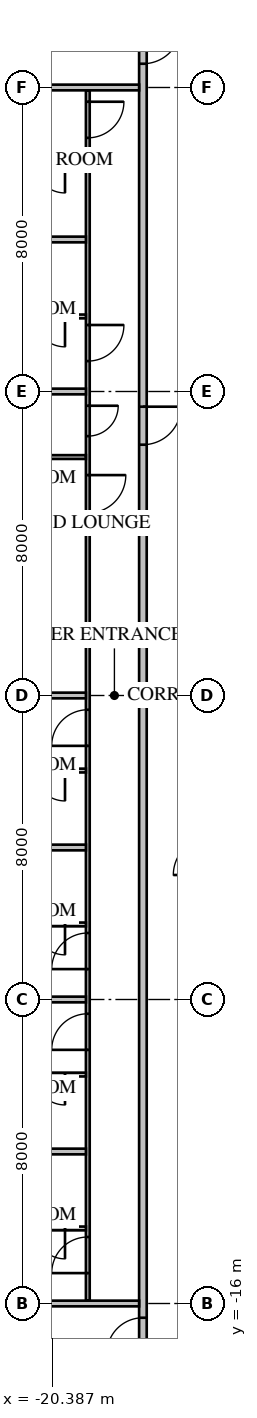
"""IFC4 building model, lengths in metres.
Left out: names, types, materials, properties, quantities, classifications, styles, units other than length and angle.
Written with IfcOpenShell. Run it as: python <this file> out.ifc"""

import sys

from ifc_helpers import new_model, si_unit, direction, frame, frame_2d, origin, place, context, subcontext, project, spatial, rectangle, extrude, element, fill, save


model = new_model("IFC4")
c1 = context("Model", 3, precision=1e-05, world=origin(), true_north=direction((0.0, 1.0)))
c2 = subcontext(c1, "Body", "Model", "MODEL_VIEW")
j1 = project(units=[si_unit("LENGTHUNIT", "METRE"), si_unit("PLANEANGLEUNIT", "RADIAN")], contexts=[c1])
p1 = place(None, origin())
s1 = spatial("IfcSite", under=j1, at=p1, CompositionType="ELEMENT")
p2 = place(p1, origin())
s2 = spatial("IfcBuilding", under=s1, at=p2, CompositionType="ELEMENT")
p3 = place(p2, frame((0.0, 0.0, 35.25)))
s3 = spatial("IfcBuildingStorey", under=s2, at=p3, CompositionType="ELEMENT", Elevation=35.25)
p4 = place(p3, frame((-18.0, 18.0, 0.0), z_axis=(0.0, 0.0, 1.0), x_axis=(0.0, -1.0, 0.0)))
e1 = element("IfcWall", 1, at=p4, inside=s3, PredefinedType="PARTITIONING", context=c2, shape_type="SweptSolid", body=[
    extrude(rectangle(XDim=36.0, YDim=0.2, at=frame_2d((18.0, 0.0))), origin(), (0.0, 0.0, 1.0), 3.65),
])
p5 = place(p4, frame((10.4, 0.0, 0.0)))
e2 = element("IfcOpeningElement", 2, at=p5, cuts=e1, PredefinedType="OPENING", context=c2, shape_type="SweptSolid", body=[
    extrude(rectangle(XDim=1.0, YDim=2.1, at=frame_2d((0.5, 1.05))), frame((0.0, 0.12, 0.0), z_axis=(0.0, -1.0, 0.0), x_axis=(1.0, 0.0, 0.0)), (0.0, 0.0, 1.0), 0.24),
])
p6 = place(p4, frame((0.375, 0.0, 0.0)))
e3 = element("IfcOpeningElement", 3, at=p6, cuts=e1, PredefinedType="OPENING", context=c2, shape_type="SweptSolid", body=[
    extrude(rectangle(XDim=1.0, YDim=2.1, at=frame_2d((0.5, 1.05))), frame((0.0, 0.12, 0.0), z_axis=(0.0, -1.0, 0.0), x_axis=(1.0, 0.0, 0.0)), (0.0, 0.0, 1.0), 0.24),
])
p7 = place(p4, frame((34.375, 0.0, 0.0)))
e4 = element("IfcOpeningElement", 4, at=p7, cuts=e1, PredefinedType="OPENING", context=c2, shape_type="SweptSolid", body=[
    extrude(rectangle(XDim=0.95, YDim=2.1, at=frame_2d((0.475, 1.05))), frame((0.0, 0.12, 0.0), z_axis=(0.0, -1.0, 0.0), x_axis=(1.0, 0.0, 0.0)), (0.0, 0.0, 1.0), 0.24),
])
p8 = place(p3, frame((-19.45, 15.925, 0.0), z_axis=(0.0, 0.0, 1.0), x_axis=(0.0, -1.0, 0.0)))
e5 = element("IfcWall", 5, at=p8, inside=s3, PredefinedType="PARTITIONING", context=c2, shape_type="SweptSolid", body=[
    extrude(rectangle(XDim=31.85, YDim=0.1, at=frame_2d((15.925, 0.0))), origin(), (0.0, 0.0, 1.0), 3.65),
])
p9 = place(p8, frame((10.125, 0.0, 0.0)))
e6 = element("IfcOpeningElement", 6, at=p9, cuts=e5, PredefinedType="OPENING", context=c2, shape_type="SweptSolid", body=[
    extrude(rectangle(XDim=1.0, YDim=2.1, at=frame_2d((0.5, 1.05))), frame((0.0, 0.07, 0.0), z_axis=(0.0, -1.0, 0.0), x_axis=(1.0, 0.0, 0.0)), (0.0, 0.0, 1.0), 0.14),
])
p10 = place(p8, frame((8.3, 0.0, 0.0)))
e7 = element("IfcOpeningElement", 7, at=p10, cuts=e5, PredefinedType="OPENING", context=c2, shape_type="SweptSolid", body=[
    extrude(rectangle(XDim=0.8, YDim=2.1, at=frame_2d((0.4, 1.05))), frame((0.0, 0.07, 0.0), z_axis=(0.0, -1.0, 0.0), x_axis=(1.0, 0.0, 0.0)), (0.0, 0.0, 1.0), 0.14),
])
p11 = place(p8, frame((0.3, 0.0, 0.0)))
e8 = element("IfcOpeningElement", 8, at=p11, cuts=e5, PredefinedType="OPENING", context=c2, shape_type="SweptSolid", body=[
    extrude(rectangle(XDim=0.95, YDim=2.1, at=frame_2d((0.475, 1.05))), frame((0.0, 0.07, 0.0), z_axis=(0.0, -1.0, 0.0), x_axis=(1.0, 0.0, 0.0)), (0.0, 0.0, 1.0), 0.14),
])
p12 = place(p8, frame((6.175, 0.0, 0.0)))
e9 = element("IfcOpeningElement", 9, at=p12, cuts=e5, PredefinedType="OPENING", context=c2, shape_type="SweptSolid", body=[
    extrude(rectangle(XDim=0.95, YDim=2.1, at=frame_2d((0.475, 1.05))), frame((0.0, 0.07, 0.0), z_axis=(0.0, -1.0, 0.0), x_axis=(1.0, 0.0, 0.0)), (0.0, 0.0, 1.0), 0.14),
])
p13 = place(p8, frame((16.3, 0.0, 0.0)))
e10 = element("IfcOpeningElement", 10, at=p13, cuts=e5, PredefinedType="OPENING", context=c2, shape_type="SweptSolid", body=[
    extrude(rectangle(XDim=0.95, YDim=2.1, at=frame_2d((0.475, 1.05))), frame((0.0, 0.07, 0.0), z_axis=(0.0, -1.0, 0.0), x_axis=(1.0, 0.0, 0.0)), (0.0, 0.0, 1.0), 0.14),
])
p14 = place(p8, frame((22.175, 0.0, 0.0)))
e11 = element("IfcOpeningElement", 11, at=p14, cuts=e5, PredefinedType="OPENING", context=c2, shape_type="SweptSolid", body=[
    extrude(rectangle(XDim=0.95, YDim=2.1, at=frame_2d((0.475, 1.05))), frame((0.0, 0.07, 0.0), z_axis=(0.0, -1.0, 0.0), x_axis=(1.0, 0.0, 0.0)), (0.0, 0.0, 1.0), 0.14),
])
p15 = place(p8, frame((24.3, 0.0, 0.0)))
e12 = element("IfcOpeningElement", 12, at=p15, cuts=e5, PredefinedType="OPENING", context=c2, shape_type="SweptSolid", body=[
    extrude(rectangle(XDim=0.95, YDim=2.1, at=frame_2d((0.475, 1.05))), frame((0.0, 0.07, 0.0), z_axis=(0.0, -1.0, 0.0), x_axis=(1.0, 0.0, 0.0)), (0.0, 0.0, 1.0), 0.14),
])
p16 = place(p8, frame((30.175, 0.0, 0.0)))
e13 = element("IfcOpeningElement", 13, at=p16, cuts=e5, PredefinedType="OPENING", context=c2, shape_type="SweptSolid", body=[
    extrude(rectangle(XDim=0.95, YDim=2.1, at=frame_2d((0.475, 1.05))), frame((0.0, 0.07, 0.0), z_axis=(0.0, -1.0, 0.0), x_axis=(1.0, 0.0, 0.0)), (0.0, 0.0, 1.0), 0.14),
])
p17 = place(p3, frame((-19.5, 6.275, 0.0), z_axis=(0.0, 0.0, 1.0), x_axis=(-1.0, 0.0, 0.0)))
e14 = element("IfcWall", 14, at=p17, inside=s3, PredefinedType="PARTITIONING", context=c2, shape_type="SweptSolid", body=[
    extrude(rectangle(XDim=2.1, YDim=0.1, at=frame_2d((1.05, 0.0))), origin(), (0.0, 0.0, 1.0), 3.65),
])
p18 = place(p3, frame((-18.1, 16.0, 0.0), z_axis=(0.0, 0.0, 1.0), x_axis=(-1.0, 0.0, 0.0)))
e15 = element("IfcWall", 15, at=p18, inside=s3, PredefinedType="PARTITIONING", context=c2, shape_type="SweptSolid", body=[
    extrude(rectangle(XDim=6.589, YDim=0.15, at=frame_2d((3.295, 0.0))), origin(), (0.0, 0.0, 1.0), 3.65),
])
for number, where, z_axis, x_axis in (
    (16, (-19.5, 12.0, 0.0), (0.0, 0.0, 1.0), (-1.0, 0.0, 0.0)),
    (17, (-19.5, 8.0, 0.0), (0.0, 0.0, 1.0), (-1.0, 0.0, 0.0)),
):
    element("IfcWall", number, at=place(p3, frame(where, z_axis=z_axis, x_axis=x_axis)), inside=s3, PredefinedType="PARTITIONING", context=c2, shape_type="SweptSolid", body=[
        extrude(rectangle(XDim=5.2, YDim=0.15, at=frame_2d((2.6, 0.0))), origin(), (0.0, 0.0, 1.0), 3.65),
    ])
p19 = place(p3, frame((-19.5, 0.0, 0.0), z_axis=(0.0, 0.0, 1.0), x_axis=(-1.0, 0.0, 0.0)))
e18 = element("IfcWall", 18, at=p19, inside=s3, PredefinedType="PARTITIONING", context=c2, shape_type="SweptSolid", body=[
    extrude(rectangle(XDim=5.2, YDim=0.15, at=frame_2d((2.6, 0.0))), origin(), (0.0, 0.0, 1.0), 2.957),
])
for number, where, z_axis, x_axis in (
    (19, (-19.5, -4.0, 0.0), (0.0, 0.0, 1.0), (-1.0, 0.0, 0.0)),
    (20, (-19.5, -8.0, 0.0), (0.0, 0.0, 1.0), (-1.0, 0.0, 0.0)),
    (21, (-19.5, -12.0, 0.0), (0.0, 0.0, 1.0), (-1.0, 0.0, 0.0)),
):
    element("IfcWall", number, at=place(p3, frame(where, z_axis=z_axis, x_axis=x_axis)), inside=s3, PredefinedType="PARTITIONING", context=c2, shape_type="SweptSolid", body=[
        extrude(rectangle(XDim=5.2, YDim=0.15, at=frame_2d((2.6, 0.0))), origin(), (0.0, 0.0, 1.0), 3.65),
    ])
p20 = place(p3, frame((-18.1, -16.0, 0.0), z_axis=(0.0, 0.0, 1.0), x_axis=(-1.0, 0.0, 0.0)))
e22 = element("IfcWall", 22, at=p20, inside=s3, PredefinedType="PARTITIONING", context=c2, shape_type="SweptSolid", body=[
    extrude(rectangle(XDim=6.589, YDim=0.15, at=frame_2d((3.295, 0.0))), origin(), (0.0, 0.0, 1.0), 3.65),
])
p21 = place(p3, frame((-19.5, 14.025, 0.0), z_axis=(0.0, 0.0, 1.0), x_axis=(-1.0, 0.0, 0.0)))
e23 = element("IfcWall", 23, at=p21, inside=s3, PredefinedType="PARTITIONING", context=c2, shape_type="SweptSolid", body=[
    extrude(rectangle(XDim=2.0, YDim=0.1, at=frame_2d((1.0, 0.0))), origin(), (0.0, 0.0, 1.0), 3.65),
])
p22 = place(p21, frame((0.55, 0.0, 0.0)))
e24 = element("IfcOpeningElement", 24, at=p22, cuts=e23, PredefinedType="OPENING", context=c2, shape_type="SweptSolid", body=[
    extrude(rectangle(XDim=0.8, YDim=2.1, at=frame_2d((0.4, 1.05))), frame((0.0, 0.07, 0.0), z_axis=(0.0, -1.0, 0.0), x_axis=(1.0, 0.0, 0.0)), (0.0, 0.0, 1.0), 0.14),
])
p23 = place(p3, frame((-19.5, 9.975, 0.0), z_axis=(0.0, 0.0, 1.0), x_axis=(-1.0, 0.0, 0.0)))
e25 = element("IfcWall", 25, at=p23, inside=s3, PredefinedType="PARTITIONING", context=c2, shape_type="SweptSolid", body=[
    extrude(rectangle(XDim=2.0, YDim=0.1, at=frame_2d((1.0, 0.0))), origin(), (0.0, 0.0, 1.0), 3.65),
])
p24 = place(p23, frame((0.55, 0.0, 0.0)))
e26 = element("IfcOpeningElement", 26, at=p24, cuts=e25, PredefinedType="OPENING", context=c2, shape_type="SweptSolid", body=[
    extrude(rectangle(XDim=0.8, YDim=2.1, at=frame_2d((0.4, 1.05))), frame((0.0, 0.07, 0.0), z_axis=(0.0, -1.0, 0.0), x_axis=(1.0, 0.0, 0.0)), (0.0, 0.0, 1.0), 0.14),
])
p25 = place(p3, frame((-19.5, -1.975, 0.0), z_axis=(0.0, 0.0, 1.0), x_axis=(-1.0, 0.0, 0.0)))
e27 = element("IfcWall", 27, at=p25, inside=s3, PredefinedType="PARTITIONING", context=c2, shape_type="SweptSolid", body=[
    extrude(rectangle(XDim=2.0, YDim=0.1, at=frame_2d((1.0, 0.0))), origin(), (0.0, 0.0, 1.0), 3.65),
])
p26 = place(p25, frame((0.55, 0.0, 0.0)))
e28 = element("IfcOpeningElement", 28, at=p26, cuts=e27, PredefinedType="OPENING", context=c2, shape_type="SweptSolid", body=[
    extrude(rectangle(XDim=0.8, YDim=2.1, at=frame_2d((0.4, 1.05))), frame((0.0, 0.07, 0.0), z_axis=(0.0, -1.0, 0.0), x_axis=(1.0, 0.0, 0.0)), (0.0, 0.0, 1.0), 0.14),
])
p27 = place(p3, frame((-19.5, -6.025, 0.0), z_axis=(0.0, 0.0, 1.0), x_axis=(-1.0, 0.0, 0.0)))
e29 = element("IfcWall", 29, at=p27, inside=s3, PredefinedType="PARTITIONING", context=c2, shape_type="SweptSolid", body=[
    extrude(rectangle(XDim=2.0, YDim=0.1, at=frame_2d((1.0, 0.0))), origin(), (0.0, 0.0, 1.0), 3.65),
])
p28 = place(p27, frame((0.55, 0.0, 0.0)))
e30 = element("IfcOpeningElement", 30, at=p28, cuts=e29, PredefinedType="OPENING", context=c2, shape_type="SweptSolid", body=[
    extrude(rectangle(XDim=0.8, YDim=2.1, at=frame_2d((0.4, 1.05))), frame((0.0, 0.07, 0.0), z_axis=(0.0, -1.0, 0.0), x_axis=(1.0, 0.0, 0.0)), (0.0, 0.0, 1.0), 0.14),
])
p29 = place(p3, frame((-19.5, -9.975, 0.0), z_axis=(0.0, 0.0, 1.0), x_axis=(-1.0, 0.0, 0.0)))
e31 = element("IfcWall", 31, at=p29, inside=s3, PredefinedType="PARTITIONING", context=c2, shape_type="SweptSolid", body=[
    extrude(rectangle(XDim=2.0, YDim=0.1, at=frame_2d((1.0, 0.0))), origin(), (0.0, 0.0, 1.0), 3.65),
])
p30 = place(p29, frame((0.55, 0.0, 0.0)))
e32 = element("IfcOpeningElement", 32, at=p30, cuts=e31, PredefinedType="OPENING", context=c2, shape_type="SweptSolid", body=[
    extrude(rectangle(XDim=0.8, YDim=2.1, at=frame_2d((0.4, 1.05))), frame((0.0, 0.07, 0.0), z_axis=(0.0, -1.0, 0.0), x_axis=(1.0, 0.0, 0.0)), (0.0, 0.0, 1.0), 0.14),
])
p31 = place(p3, frame((-19.5, -14.025, 0.0), z_axis=(0.0, 0.0, 1.0), x_axis=(-1.0, 0.0, 0.0)))
e33 = element("IfcWall", 33, at=p31, inside=s3, PredefinedType="PARTITIONING", context=c2, shape_type="SweptSolid", body=[
    extrude(rectangle(XDim=2.0, YDim=0.1, at=frame_2d((1.0, 0.0))), origin(), (0.0, 0.0, 1.0), 3.65),
])
p32 = place(p31, frame((0.55, 0.0, 0.0)))
e34 = element("IfcOpeningElement", 34, at=p32, cuts=e33, PredefinedType="OPENING", context=c2, shape_type="SweptSolid", body=[
    extrude(rectangle(XDim=0.8, YDim=2.1, at=frame_2d((0.4, 1.05))), frame((0.0, 0.07, 0.0), z_axis=(0.0, -1.0, 0.0), x_axis=(1.0, 0.0, 0.0)), (0.0, 0.0, 1.0), 0.14),
])
p33 = place(p5, origin())
e35 = element("IfcDoor", 35, at=p33, inside=s3, OperationType="SINGLE_SWING_LEFT", PredefinedType="DOOR", context=c2, shape_type="SweptSolid", body=[
    extrude(rectangle(XDim=1.0, YDim=2.1, at=frame_2d((0.5, 1.05))), frame((0.0, 0.025, 0.0), z_axis=(0.0, -1.0, 0.0), x_axis=(1.0, 0.0, 0.0)), (0.0, 0.0, 1.0), 0.05),
])
fill(e2, e35)
p34 = place(p9, origin())
e36 = element("IfcDoor", 36, at=p34, inside=s3, OperationType="SINGLE_SWING_LEFT", PredefinedType="DOOR", context=c2, shape_type="SweptSolid", body=[
    extrude(rectangle(XDim=1.0, YDim=2.1, at=frame_2d((0.5, 1.05))), frame((0.0, 0.025, 0.0), z_axis=(0.0, -1.0, 0.0), x_axis=(1.0, 0.0, 0.0)), (0.0, 0.0, 1.0), 0.05),
])
fill(e6, e36)
p35 = place(p10, origin())
e37 = element("IfcDoor", 37, at=p35, inside=s3, OperationType="SINGLE_SWING_LEFT", PredefinedType="DOOR", context=c2, shape_type="SweptSolid", body=[
    extrude(rectangle(XDim=0.8, YDim=2.1, at=frame_2d((0.4, 1.05))), frame((0.0, 0.025, 0.0), z_axis=(0.0, -1.0, 0.0), x_axis=(1.0, 0.0, 0.0)), (0.0, 0.0, 1.0), 0.05),
])
fill(e7, e37)
p36 = place(p6, origin())
e38 = element("IfcDoor", 38, at=p36, inside=s3, OperationType="SINGLE_SWING_LEFT", PredefinedType="DOOR", context=c2, shape_type="SweptSolid", body=[
    extrude(rectangle(XDim=1.0, YDim=2.1, at=frame_2d((0.5, 1.05))), frame((0.0, 0.025, 0.0), z_axis=(0.0, -1.0, 0.0), x_axis=(1.0, 0.0, 0.0)), (0.0, 0.0, 1.0), 0.05),
])
fill(e3, e38)
p37 = place(p11, origin())
e39 = element("IfcDoor", 39, at=p37, inside=s3, OperationType="SINGLE_SWING_LEFT", PredefinedType="DOOR", context=c2, shape_type="SweptSolid", body=[
    extrude(rectangle(XDim=0.95, YDim=2.1, at=frame_2d((0.475, 1.05))), frame((0.0, 0.025, 0.0), z_axis=(0.0, -1.0, 0.0), x_axis=(1.0, 0.0, 0.0)), (0.0, 0.0, 1.0), 0.05),
])
fill(e8, e39)
p38 = place(p22, origin())
e40 = element("IfcDoor", 40, at=p38, inside=s3, OperationType="SINGLE_SWING_LEFT", PredefinedType="DOOR", context=c2, shape_type="SweptSolid", body=[
    extrude(rectangle(XDim=0.8, YDim=2.1, at=frame_2d((0.4, 1.05))), frame((0.0, 0.025, 0.0), z_axis=(0.0, -1.0, 0.0), x_axis=(1.0, 0.0, 0.0)), (0.0, 0.0, 1.0), 0.05),
])
fill(e24, e40)
p39 = place(p12, origin())
e41 = element("IfcDoor", 41, at=p39, inside=s3, OperationType="SINGLE_SWING_LEFT", PredefinedType="DOOR", context=c2, shape_type="SweptSolid", body=[
    extrude(rectangle(XDim=0.95, YDim=2.1, at=frame_2d((0.475, 1.05))), frame((0.0, 0.025, 0.0), z_axis=(0.0, -1.0, 0.0), x_axis=(1.0, 0.0, 0.0)), (0.0, 0.0, 1.0), 0.05),
])
fill(e9, e41)
p40 = place(p24, origin())
e42 = element("IfcDoor", 42, at=p40, inside=s3, OperationType="SINGLE_SWING_LEFT", PredefinedType="DOOR", context=c2, shape_type="SweptSolid", body=[
    extrude(rectangle(XDim=0.8, YDim=2.1, at=frame_2d((0.4, 1.05))), frame((0.0, 0.025, 0.0), z_axis=(0.0, -1.0, 0.0), x_axis=(1.0, 0.0, 0.0)), (0.0, 0.0, 1.0), 0.05),
])
fill(e26, e42)
p41 = place(p13, origin())
e43 = element("IfcDoor", 43, at=p41, inside=s3, OperationType="SINGLE_SWING_RIGHT", PredefinedType="DOOR", context=c2, shape_type="SweptSolid", body=[
    extrude(rectangle(XDim=0.95, YDim=2.1, at=frame_2d((0.475, 1.05))), frame((0.0, 0.025, 0.0), z_axis=(0.0, -1.0, 0.0), x_axis=(1.0, 0.0, 0.0)), (0.0, 0.0, 1.0), 0.05),
])
fill(e10, e43)
p42 = place(p26, origin())
e44 = element("IfcDoor", 44, at=p42, inside=s3, OperationType="SINGLE_SWING_LEFT", PredefinedType="DOOR", context=c2, shape_type="SweptSolid", body=[
    extrude(rectangle(XDim=0.8, YDim=2.1, at=frame_2d((0.4, 1.05))), frame((0.0, 0.025, 0.0), z_axis=(0.0, -1.0, 0.0), x_axis=(1.0, 0.0, 0.0)), (0.0, 0.0, 1.0), 0.05),
])
fill(e28, e44)
p43 = place(p14, origin())
e45 = element("IfcDoor", 45, at=p43, inside=s3, OperationType="SINGLE_SWING_RIGHT", PredefinedType="DOOR", context=c2, shape_type="SweptSolid", body=[
    extrude(rectangle(XDim=0.95, YDim=2.1, at=frame_2d((0.475, 1.05))), frame((0.0, 0.025, 0.0), z_axis=(0.0, -1.0, 0.0), x_axis=(1.0, 0.0, 0.0)), (0.0, 0.0, 1.0), 0.05),
])
fill(e11, e45)
p44 = place(p28, origin())
e46 = element("IfcDoor", 46, at=p44, inside=s3, OperationType="SINGLE_SWING_LEFT", PredefinedType="DOOR", context=c2, shape_type="SweptSolid", body=[
    extrude(rectangle(XDim=0.8, YDim=2.1, at=frame_2d((0.4, 1.05))), frame((0.0, 0.025, 0.0), z_axis=(0.0, -1.0, 0.0), x_axis=(1.0, 0.0, 0.0)), (0.0, 0.0, 1.0), 0.05),
])
fill(e30, e46)
p45 = place(p15, origin())
e47 = element("IfcDoor", 47, at=p45, inside=s3, OperationType="SINGLE_SWING_RIGHT", PredefinedType="DOOR", context=c2, shape_type="SweptSolid", body=[
    extrude(rectangle(XDim=0.95, YDim=2.1, at=frame_2d((0.475, 1.05))), frame((0.0, 0.025, 0.0), z_axis=(0.0, -1.0, 0.0), x_axis=(1.0, 0.0, 0.0)), (0.0, 0.0, 1.0), 0.05),
])
fill(e12, e47)
p46 = place(p30, origin())
e48 = element("IfcDoor", 48, at=p46, inside=s3, OperationType="SINGLE_SWING_LEFT", PredefinedType="DOOR", context=c2, shape_type="SweptSolid", body=[
    extrude(rectangle(XDim=0.8, YDim=2.1, at=frame_2d((0.4, 1.05))), frame((0.0, 0.025, 0.0), z_axis=(0.0, -1.0, 0.0), x_axis=(1.0, 0.0, 0.0)), (0.0, 0.0, 1.0), 0.05),
])
fill(e32, e48)
p47 = place(p16, origin())
e49 = element("IfcDoor", 49, at=p47, inside=s3, OperationType="SINGLE_SWING_RIGHT", PredefinedType="DOOR", context=c2, shape_type="SweptSolid", body=[
    extrude(rectangle(XDim=0.95, YDim=2.1, at=frame_2d((0.475, 1.05))), frame((0.0, 0.025, 0.0), z_axis=(0.0, -1.0, 0.0), x_axis=(1.0, 0.0, 0.0)), (0.0, 0.0, 1.0), 0.05),
])
fill(e13, e49)
p48 = place(p32, origin())
e50 = element("IfcDoor", 50, at=p48, inside=s3, OperationType="SINGLE_SWING_LEFT", PredefinedType="DOOR", context=c2, shape_type="SweptSolid", body=[
    extrude(rectangle(XDim=0.8, YDim=2.1, at=frame_2d((0.4, 1.05))), frame((0.0, 0.025, 0.0), z_axis=(0.0, -1.0, 0.0), x_axis=(1.0, 0.0, 0.0)), (0.0, 0.0, 1.0), 0.05),
])
fill(e34, e50)
p49 = place(p7, origin())
e51 = element("IfcDoor", 51, at=p49, inside=s3, OperationType="SINGLE_SWING_RIGHT", PredefinedType="DOOR", context=c2, shape_type="SweptSolid", body=[
    extrude(rectangle(XDim=0.95, YDim=2.1, at=frame_2d((0.475, 1.05))), frame((0.0, 0.025, 0.0), z_axis=(0.0, -1.0, 0.0), x_axis=(1.0, 0.0, 0.0)), (0.0, 0.0, 1.0), 0.05),
])
fill(e4, e51)
save(model, sys.argv[1])
